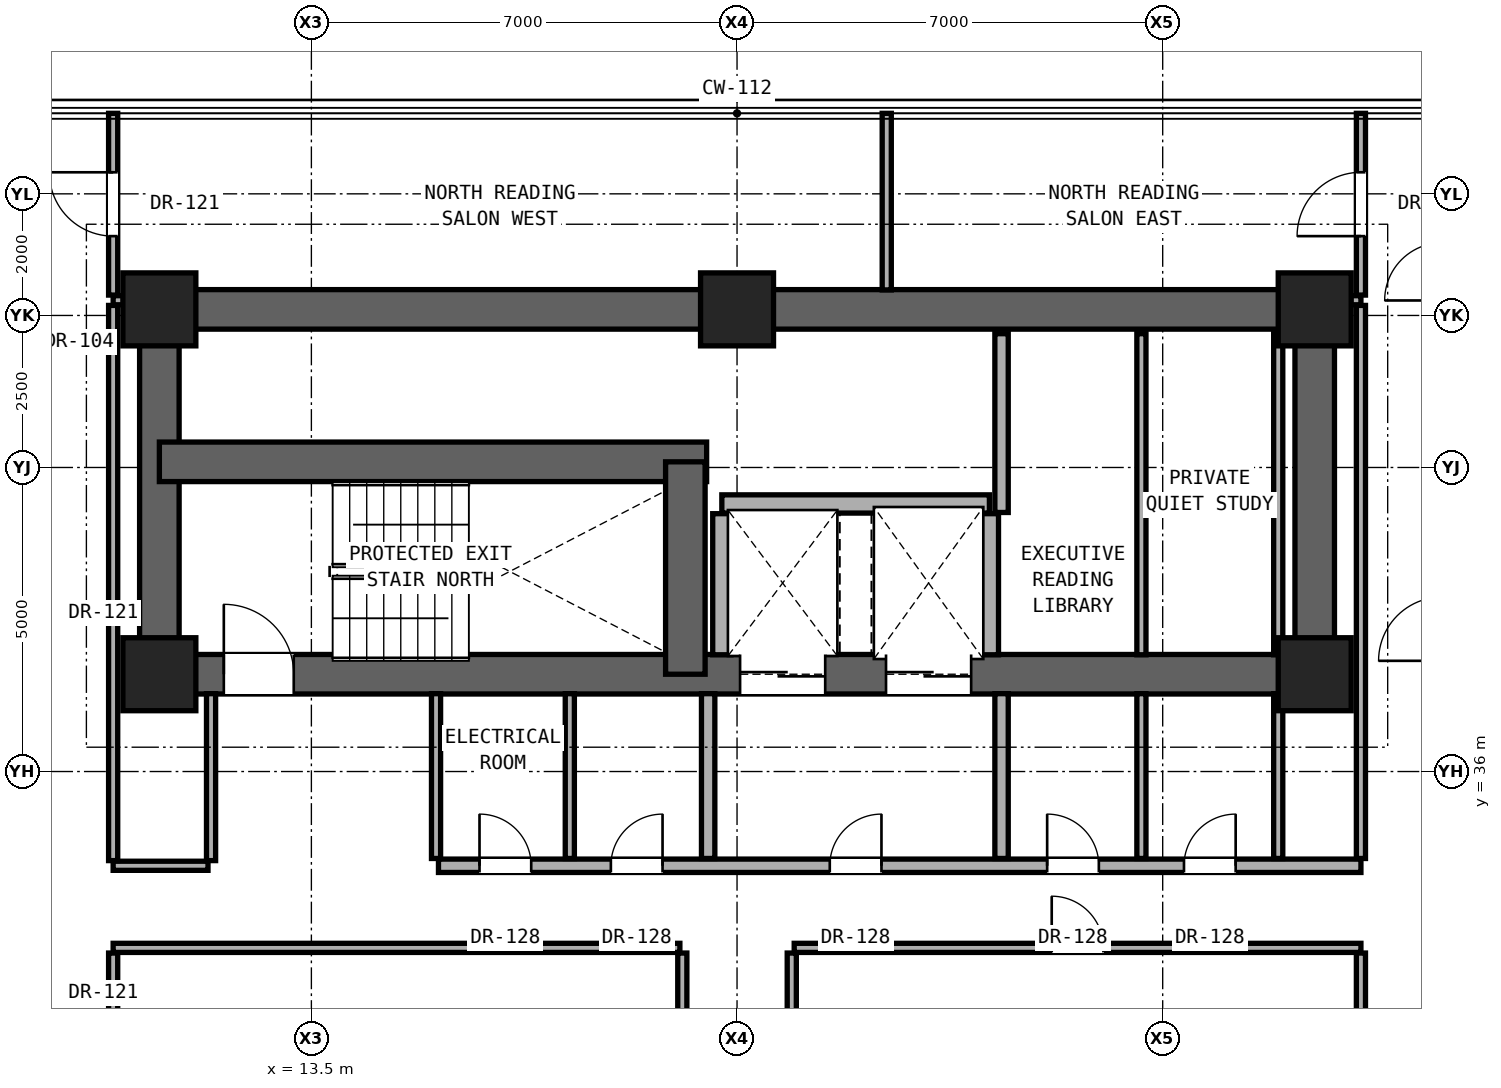
"""IFC4 building model, lengths in metres.
Left out: names, types, materials, properties, quantities, classifications, styles, units other than length and angle.
Written with IfcOpenShell. Run it as: python <this file> out.ifc"""

import sys

from ifc_helpers import new_model, si_unit, direction, frame, frame_2d, origin, origin_2d, place, context, subcontext, project, spatial, rectangle, extrude, element, fill, save


model = new_model("IFC4")
c1 = context("Model", 3, precision=1e-05, world=origin(), true_north=direction((0.0, 1.0)))
c2 = subcontext(c1, "Body", "Model", "MODEL_VIEW")
j1 = project(units=[si_unit("LENGTHUNIT", "METRE"), si_unit("PLANEANGLEUNIT", "RADIAN")], contexts=[c1])
p1 = place(None, origin())
s1 = spatial("IfcSite", under=j1, at=p1, CompositionType="ELEMENT")
p2 = place(p1, origin())
s2 = spatial("IfcBuilding", under=s1, at=p2, CompositionType="ELEMENT")
p3 = place(p2, frame((0.0, 0.0, 98.3)))
s3 = spatial("IfcBuildingStorey", under=s2, at=p3, CompositionType="ELEMENT", Elevation=98.3)
for number, where, z_axis, x_axis in (
    (1, (11.0, 37.6, 0.0), (0.0, 0.0, 1.0), (1.0, 0.0, 0.0)),
    (2, (30.0, 37.6, 0.0), (0.0, 0.0, 1.0), (1.0, 0.0, 0.0)),
    (3, (11.0, 43.6, 0.0), (0.0, 0.0, 1.0), (1.0, 0.0, 0.0)),
    (4, (20.5, 43.6, 0.0), (0.0, 0.0, 1.0), (1.0, 0.0, 0.0)),
    (5, (30.0, 43.6, 0.0), (0.0, 0.0, 1.0), (1.0, 0.0, 0.0)),
):
    element("IfcColumn", number, at=place(p3, frame(where, z_axis=z_axis, x_axis=x_axis)), inside=s3, PredefinedType="COLUMN", context=c2, shape_type="SweptSolid", body=[
        extrude(rectangle(XDim=1.2, YDim=1.2, at=origin_2d()), origin(), (0.0, 0.0, 1.0), 3.3),
    ])
p4 = place(p3, frame((11.0, 43.6, 0.0), z_axis=(0.0, 0.0, 1.0), x_axis=(1.0, 0.0, 0.0)))
e6 = element("IfcWall", 6, at=p4, inside=s3, PredefinedType="SHEAR", context=c2, shape_type="SweptSolid", body=[
    extrude(rectangle(XDim=19.0, YDim=0.65, at=frame_2d((9.5, 0.0))), origin(), (0.0, 0.0, 1.0), 3.08),
])
for number, where, z_axis, x_axis in (
    (7, (11.0, 37.6, 0.0), (0.0, 0.0, 1.0), (0.0, 1.0, 0.0)),
    (8, (30.0, 37.6, 0.0), (0.0, 0.0, 1.0), (0.0, 1.0, 0.0)),
):
    element("IfcWall", number, at=place(p3, frame(where, z_axis=z_axis, x_axis=x_axis)), inside=s3, PredefinedType="SHEAR", context=c2, shape_type="SweptSolid", body=[
        extrude(rectangle(XDim=6.0, YDim=0.65, at=frame_2d((3.0, 0.0))), origin(), (0.0, 0.0, 1.0), 3.08),
    ])
p5 = place(p3, frame((11.0, 37.6, 0.0), z_axis=(0.0, 0.0, 1.0), x_axis=(1.0, 0.0, 0.0)))
e9 = element("IfcWall", 9, at=p5, inside=s3, PredefinedType="SHEAR", context=c2, shape_type="SweptSolid", body=[
    extrude(rectangle(XDim=19.0, YDim=0.65, at=frame_2d((9.5, 0.0))), origin(), (0.0, 0.0, 1.0), 3.08),
])
p6 = place(p5, frame((1.06, 0.0, 0.0)))
e10 = element("IfcOpeningElement", 10, at=p6, cuts=e9, PredefinedType="OPENING", context=c2, shape_type="SweptSolid", body=[
    extrude(rectangle(XDim=1.15, YDim=2.2, at=frame_2d((0.575, 1.1))), frame((0.0, 0.335, 0.0), z_axis=(0.0, -1.0, 0.0), x_axis=(1.0, 0.0, 0.0)), (0.0, 0.0, 1.0), 0.67),
])
p7 = place(p5, frame((9.55, 0.0, 0.0)))
e11 = element("IfcOpeningElement", 11, at=p7, cuts=e9, PredefinedType="OPENING", context=c2, shape_type="SweptSolid", body=[
    extrude(rectangle(XDim=1.4, YDim=2.35, at=frame_2d((0.7, 1.175))), frame((0.0, 0.335, 0.0), z_axis=(0.0, -1.0, 0.0), x_axis=(1.0, 0.0, 0.0)), (0.0, 0.0, 1.0), 0.67),
])
p8 = place(p5, frame((11.95, 0.0, 0.0)))
e12 = element("IfcOpeningElement", 12, at=p8, cuts=e9, PredefinedType="OPENING", context=c2, shape_type="SweptSolid", body=[
    extrude(rectangle(XDim=1.4, YDim=2.35, at=frame_2d((0.7, 1.175))), frame((0.0, 0.335, 0.0), z_axis=(0.0, -1.0, 0.0), x_axis=(1.0, 0.0, 0.0)), (0.0, 0.0, 1.0), 0.67),
])
p9 = place(p3, frame((11.0, 41.093, 0.0), z_axis=(0.0, 0.0, 1.0), x_axis=(1.0, 0.0, 0.0)))
e13 = element("IfcWall", 13, at=p9, inside=s3, PredefinedType="SHEAR", context=c2, shape_type="SweptSolid", body=[
    extrude(rectangle(XDim=9.0, YDim=0.65, at=frame_2d((4.5, 0.0))), origin(), (0.0, 0.0, 1.0), 3.08),
])
p10 = place(p3, frame((19.65, 37.6, 0.0), z_axis=(0.0, 0.0, 1.0), x_axis=(0.0, 1.0, 0.0)))
e14 = element("IfcWall", 14, at=p10, inside=s3, PredefinedType="SHEAR", context=c2, shape_type="SweptSolid", body=[
    extrude(rectangle(XDim=3.493, YDim=0.65, at=frame_2d((1.747, 0.0))), origin(), (0.0, 0.0, 1.0), 3.08),
])
p11 = place(p3, frame((10.24, 33.1, 0.0), z_axis=(0.0, 0.0, 1.0), x_axis=(1.0, 0.0, 0.0)))
e15 = element("IfcWall", 15, at=p11, inside=s3, PredefinedType="PARTITIONING", context=c2, shape_type="SweptSolid", body=[
    extrude(rectangle(XDim=9.32, YDim=0.15, at=frame_2d((4.66, 0.0))), origin(), (0.0, 0.0, 1.0), 2.124),
])
p12 = place(p3, frame((21.44, 33.1, 0.0), z_axis=(0.0, 0.0, 1.0), x_axis=(1.0, 0.0, 0.0)))
e16 = element("IfcWall", 16, at=p12, inside=s3, PredefinedType="PARTITIONING", context=c2, shape_type="SweptSolid", body=[
    extrude(rectangle(XDim=9.32, YDim=0.15, at=frame_2d((4.66, 0.0))), origin(), (0.0, 0.0, 1.0), 2.124),
])
p13 = place(p12, frame((4.235, 0.0, 0.0)))
e17 = element("IfcOpeningElement", 17, at=p13, cuts=e16, PredefinedType="OPENING", context=c2, shape_type="SweptSolid", body=[
    extrude(rectangle(XDim=0.85, YDim=2.01, at=frame_2d((0.425, 1.005))), frame((0.0, 0.085, 0.0), z_axis=(0.0, -1.0, 0.0), x_axis=(1.0, 0.0, 0.0)), (0.0, 0.0, 1.0), 0.17),
])
p14 = place(p3, frame((10.24, 34.45, 0.0), z_axis=(0.0, 0.0, 1.0), x_axis=(1.0, 0.0, 0.0)))
e18 = element("IfcWall", 18, at=p14, inside=s3, PredefinedType="PARTITIONING", context=c2, shape_type="SweptSolid", body=[
    extrude(rectangle(XDim=1.56, YDim=0.15, at=frame_2d((0.78, 0.0))), origin(), (0.0, 0.0, 1.0), 2.124),
])
p15 = place(p3, frame((15.59, 34.45, 0.0), z_axis=(0.0, 0.0, 1.0), x_axis=(1.0, 0.0, 0.0)))
e19 = element("IfcWall", 19, at=p15, inside=s3, PredefinedType="SOLIDWALL", context=c2, shape_type="SweptSolid", body=[
    extrude(rectangle(XDim=15.17, YDim=0.22, at=frame_2d((7.585, 0.0))), origin(), (0.0, 0.0, 1.0), 2.124),
])
p16 = place(p15, frame((6.435, 0.0, 0.0)))
e20 = element("IfcOpeningElement", 20, at=p16, cuts=e19, PredefinedType="OPENING", context=c2, shape_type="SweptSolid", body=[
    extrude(rectangle(XDim=0.85, YDim=2.01, at=frame_2d((0.425, 1.005))), frame((0.0, 0.12, 0.0), z_axis=(0.0, -1.0, 0.0), x_axis=(1.0, 0.0, 0.0)), (0.0, 0.0, 1.0), 0.24),
])
p17 = place(p15, frame((10.01, 0.0, 0.0)))
e21 = element("IfcOpeningElement", 21, at=p17, cuts=e19, PredefinedType="OPENING", context=c2, shape_type="SweptSolid", body=[
    extrude(rectangle(XDim=0.85, YDim=2.01, at=frame_2d((0.425, 1.005))), frame((0.0, 0.12, 0.0), z_axis=(0.0, -1.0, 0.0), x_axis=(1.0, 0.0, 0.0)), (0.0, 0.0, 1.0), 0.24),
])
p18 = place(p15, frame((12.26, 0.0, 0.0)))
e22 = element("IfcOpeningElement", 22, at=p18, cuts=e19, PredefinedType="OPENING", context=c2, shape_type="SweptSolid", body=[
    extrude(rectangle(XDim=0.85, YDim=2.01, at=frame_2d((0.425, 1.005))), frame((0.0, 0.12, 0.0), z_axis=(0.0, -1.0, 0.0), x_axis=(1.0, 0.0, 0.0)), (0.0, 0.0, 1.0), 0.24),
])
p19 = place(p15, frame((0.675, 0.0, 0.0)))
e23 = element("IfcOpeningElement", 23, at=p19, cuts=e19, PredefinedType="OPENING", context=c2, shape_type="SweptSolid", body=[
    extrude(rectangle(XDim=0.85, YDim=2.01, at=frame_2d((0.425, 1.005))), frame((0.0, 0.12, 0.0), z_axis=(0.0, -1.0, 0.0), x_axis=(1.0, 0.0, 0.0)), (0.0, 0.0, 1.0), 0.24),
])
p20 = place(p15, frame((2.835, 0.0, 0.0)))
e24 = element("IfcOpeningElement", 24, at=p20, cuts=e19, PredefinedType="OPENING", context=c2, shape_type="SweptSolid", body=[
    extrude(rectangle(XDim=0.85, YDim=2.01, at=frame_2d((0.425, 1.005))), frame((0.0, 0.12, 0.0), z_axis=(0.0, -1.0, 0.0), x_axis=(1.0, 0.0, 0.0)), (0.0, 0.0, 1.0), 0.24),
])
p21 = place(p3, frame((20.25, 40.4, 0.0), z_axis=(0.0, 0.0, 1.0), x_axis=(1.0, 0.0, 0.0)))
e25 = element("IfcWall", 25, at=p21, inside=s3, PredefinedType="SOLIDWALL", context=c2, shape_type="SweptSolid", body=[
    extrude(rectangle(XDim=4.4, YDim=0.3, at=frame_2d((2.2, 0.0))), origin(), (0.0, 0.0, 1.0), 3.08),
])
for number, where, z_axis, x_axis in (
    (26, (10.24, 43.75, 0.0), (0.0, 0.0, 1.0), (1.0, 0.0, 0.0)),
    (27, (30.32, 43.75, 0.0), (0.0, 0.0, 1.0), (1.0, 0.0, 0.0)),
):
    element("IfcWall", number, at=place(p3, frame(where, z_axis=z_axis, x_axis=x_axis)), inside=s3, PredefinedType="PARTITIONING", context=c2, shape_type="SweptSolid", body=[
        extrude(rectangle(XDim=0.44, YDim=0.15, at=frame_2d((0.22, 0.0))), origin(), (0.0, 0.0, 1.0), 3.08),
    ])
p22 = place(p3, frame((10.24, 27.485, 0.0), z_axis=(0.0, 0.0, 1.0), x_axis=(0.0, 1.0, 0.0)))
e28 = element("IfcWall", 28, at=p22, inside=s3, PredefinedType="PARTITIONING", context=c2, shape_type="SweptSolid", body=[
    extrude(rectangle(XDim=5.53, YDim=0.15, at=frame_2d((2.765, 0.0))), origin(), (0.0, 0.0, 1.0), 2.299),
])
p23 = place(p22, frame((2.29, 0.0, 0.0)))
e29 = element("IfcOpeningElement", 29, at=p23, cuts=e28, PredefinedType="OPENING", context=c2, shape_type="SweptSolid", body=[
    extrude(rectangle(XDim=0.95, YDim=2.15, at=frame_2d((0.475, 1.075))), frame((0.0, 0.085, 0.0), z_axis=(0.0, -1.0, 0.0), x_axis=(1.0, 0.0, 0.0)), (0.0, 0.0, 1.0), 0.17),
])
p24 = place(p3, frame((10.24, 34.535, 0.0), z_axis=(0.0, 0.0, 1.0), x_axis=(0.0, 1.0, 0.0)))
e30 = element("IfcWall", 30, at=p24, inside=s3, PredefinedType="PARTITIONING", context=c2, shape_type="SweptSolid", body=[
    extrude(rectangle(XDim=9.13, YDim=0.15, at=frame_2d((4.565, 0.0))), origin(), (0.0, 0.0, 1.0), 2.456),
])
p25 = place(p3, frame((10.24, 43.835, 0.0), z_axis=(0.0, 0.0, 1.0), x_axis=(0.0, 1.0, 0.0)))
e31 = element("IfcWall", 31, at=p25, inside=s3, PredefinedType="PARTITIONING", context=c2, shape_type="SweptSolid", body=[
    extrude(rectangle(XDim=2.989, YDim=0.15, at=frame_2d((1.495, 0.0))), origin(), (0.0, 0.0, 1.0), 3.08),
])
p26 = place(p25, frame((0.969, 0.0, 0.0)))
e32 = element("IfcOpeningElement", 32, at=p26, cuts=e31, PredefinedType="OPENING", context=c2, shape_type="SweptSolid", body=[
    extrude(rectangle(XDim=1.05, YDim=2.2, at=frame_2d((0.525, 1.1))), frame((0.0, 0.085, 0.0), z_axis=(0.0, -1.0, 0.0), x_axis=(1.0, 0.0, 0.0)), (0.0, 0.0, 1.0), 0.17),
])
p27 = place(p3, frame((11.85, 34.535, 0.0), z_axis=(0.0, 0.0, 1.0), x_axis=(0.0, 1.0, 0.0)))
e33 = element("IfcWall", 33, at=p27, inside=s3, PredefinedType="PARTITIONING", context=c2, shape_type="SweptSolid", body=[
    extrude(rectangle(XDim=2.745, YDim=0.15, at=frame_2d((1.373, 0.0))), origin(), (0.0, 0.0, 1.0), 3.08),
])
p28 = place(p3, frame((15.55, 34.57, 0.0), z_axis=(0.0, 0.0, 1.0), x_axis=(0.0, 1.0, 0.0)))
e34 = element("IfcWall", 34, at=p28, inside=s3, PredefinedType="PARTITIONING", context=c2, shape_type="SweptSolid", body=[
    extrude(rectangle(XDim=2.71, YDim=0.15, at=frame_2d((1.355, 0.0))), origin(), (0.0, 0.0, 1.0), 2.609),
])
p29 = place(p3, frame((17.75, 34.57, 0.0), z_axis=(0.0, 0.0, 1.0), x_axis=(0.0, 1.0, 0.0)))
e35 = element("IfcWall", 35, at=p29, inside=s3, PredefinedType="PARTITIONING", context=c2, shape_type="SweptSolid", body=[
    extrude(rectangle(XDim=2.71, YDim=0.15, at=frame_2d((1.355, 0.0))), origin(), (0.0, 0.0, 1.0), 3.08),
])
p30 = place(p3, frame((19.6, 27.485, 0.0), z_axis=(0.0, 0.0, 1.0), x_axis=(0.0, 1.0, 0.0)))
e36 = element("IfcWall", 36, at=p30, inside=s3, PredefinedType="PARTITIONING", context=c2, shape_type="SweptSolid", body=[
    extrude(rectangle(XDim=5.53, YDim=0.15, at=frame_2d((2.765, 0.0))), origin(), (0.0, 0.0, 1.0), 2.124),
])
p31 = place(p3, frame((20.025, 34.57, 0.0), z_axis=(0.0, 0.0, 1.0), x_axis=(0.0, 1.0, 0.0)))
e37 = element("IfcWall", 37, at=p31, inside=s3, PredefinedType="SOLIDWALL", context=c2, shape_type="SweptSolid", body=[
    extrude(rectangle(XDim=2.71, YDim=0.22, at=frame_2d((1.355, 0.0))), origin(), (0.0, 0.0, 1.0), 3.08),
])
p32 = place(p3, frame((20.25, 37.92, 0.0), z_axis=(0.0, 0.0, 1.0), x_axis=(0.0, 1.0, 0.0)))
e38 = element("IfcWall", 38, at=p32, inside=s3, PredefinedType="SOLIDWALL", context=c2, shape_type="SweptSolid", body=[
    extrude(rectangle(XDim=2.32, YDim=0.3, at=frame_2d((1.16, 0.0))), origin(), (0.0, 0.0, 1.0), 3.08),
])
p33 = place(p3, frame((21.4, 27.485, 0.0), z_axis=(0.0, 0.0, 1.0), x_axis=(0.0, 1.0, 0.0)))
e39 = element("IfcWall", 39, at=p33, inside=s3, PredefinedType="PARTITIONING", context=c2, shape_type="SweptSolid", body=[
    extrude(rectangle(XDim=5.53, YDim=0.15, at=frame_2d((2.765, 0.0))), origin(), (0.0, 0.0, 1.0), 2.124),
])
p34 = place(p3, frame((22.962, 43.92, 0.0), z_axis=(0.0, 0.0, 1.0), x_axis=(0.0, 1.0, 0.0)))
e40 = element("IfcWall", 40, at=p34, inside=s3, PredefinedType="PARTITIONING", context=c2, shape_type="SweptSolid", body=[
    extrude(rectangle(XDim=2.904, YDim=0.15, at=frame_2d((1.452, 0.0))), origin(), (0.0, 0.0, 1.0), 3.08),
])
p35 = place(p3, frame((24.65, 37.92, 0.0), z_axis=(0.0, 0.0, 1.0), x_axis=(0.0, 1.0, 0.0)))
e41 = element("IfcWall", 41, at=p35, inside=s3, PredefinedType="SOLIDWALL", context=c2, shape_type="SweptSolid", body=[
    extrude(rectangle(XDim=2.32, YDim=0.3, at=frame_2d((1.16, 0.0))), origin(), (0.0, 0.0, 1.0), 3.08),
])
p36 = place(p3, frame((24.85, 34.57, 0.0), z_axis=(0.0, 0.0, 1.0), x_axis=(0.0, 1.0, 0.0)))
e42 = element("IfcWall", 42, at=p36, inside=s3, PredefinedType="SOLIDWALL", context=c2, shape_type="SweptSolid", body=[
    extrude(rectangle(XDim=2.71, YDim=0.22, at=frame_2d((1.355, 0.0))), origin(), (0.0, 0.0, 1.0), 3.08),
])
p37 = place(p3, frame((24.85, 40.26, 0.0), z_axis=(0.0, 0.0, 1.0), x_axis=(0.0, 1.0, 0.0)))
e43 = element("IfcWall", 43, at=p37, inside=s3, PredefinedType="SOLIDWALL", context=c2, shape_type="SweptSolid", body=[
    extrude(rectangle(XDim=2.94, YDim=0.22, at=frame_2d((1.47, 0.0))), origin(), (0.0, 0.0, 1.0), 3.08),
])
p38 = place(p3, frame((27.15, 34.57, 0.0), z_axis=(0.0, 0.0, 1.0), x_axis=(0.0, 1.0, 0.0)))
e44 = element("IfcWall", 44, at=p38, inside=s3, PredefinedType="PARTITIONING", context=c2, shape_type="SweptSolid", body=[
    extrude(rectangle(XDim=2.71, YDim=0.15, at=frame_2d((1.355, 0.0))), origin(), (0.0, 0.0, 1.0), 3.08),
])
p39 = place(p3, frame((27.15, 37.92, 0.0), z_axis=(0.0, 0.0, 1.0), x_axis=(0.0, 1.0, 0.0)))
e45 = element("IfcWall", 45, at=p39, inside=s3, PredefinedType="PARTITIONING", context=c2, shape_type="SweptSolid", body=[
    extrude(rectangle(XDim=5.28, YDim=0.15, at=frame_2d((2.64, 0.0))), origin(), (0.0, 0.0, 1.0), 3.08),
])
p40 = place(p3, frame((29.4, 34.57, 0.0), z_axis=(0.0, 0.0, 1.0), x_axis=(0.0, 1.0, 0.0)))
e46 = element("IfcWall", 46, at=p40, inside=s3, PredefinedType="PARTITIONING", context=c2, shape_type="SweptSolid", body=[
    extrude(rectangle(XDim=2.71, YDim=0.15, at=frame_2d((1.355, 0.0))), origin(), (0.0, 0.0, 1.0), 3.08),
])
p41 = place(p3, frame((29.4, 37.92, 0.0), z_axis=(0.0, 0.0, 1.0), x_axis=(0.0, 1.0, 0.0)))
e47 = element("IfcWall", 47, at=p41, inside=s3, PredefinedType="PARTITIONING", context=c2, shape_type="SweptSolid", body=[
    extrude(rectangle(XDim=5.28, YDim=0.15, at=frame_2d((2.64, 0.0))), origin(), (0.0, 0.0, 1.0), 3.08),
])
p42 = place(p3, frame((30.76, 27.485, 0.0), z_axis=(0.0, 0.0, 1.0), x_axis=(0.0, 1.0, 0.0)))
e48 = element("IfcWall", 48, at=p42, inside=s3, PredefinedType="PARTITIONING", context=c2, shape_type="SweptSolid", body=[
    extrude(rectangle(XDim=5.53, YDim=0.15, at=frame_2d((2.765, 0.0))), origin(), (0.0, 0.0, 1.0), 2.299),
])
p43 = place(p3, frame((30.76, 34.57, 0.0), z_axis=(0.0, 0.0, 1.0), x_axis=(0.0, 1.0, 0.0)))
e49 = element("IfcWall", 49, at=p43, inside=s3, PredefinedType="PARTITIONING", context=c2, shape_type="SweptSolid", body=[
    extrude(rectangle(XDim=9.095, YDim=0.15, at=frame_2d((4.547, 0.0))), origin(), (0.0, 0.0, 1.0), 2.456),
])
p44 = place(p3, frame((30.76, 43.835, 0.0), z_axis=(0.0, 0.0, 1.0), x_axis=(0.0, 1.0, 0.0)))
e50 = element("IfcWall", 50, at=p44, inside=s3, PredefinedType="PARTITIONING", context=c2, shape_type="SweptSolid", body=[
    extrude(rectangle(XDim=2.989, YDim=0.15, at=frame_2d((1.495, 0.0))), origin(), (0.0, 0.0, 1.0), 3.08),
])
p45 = place(p44, frame((0.969, 0.0, 0.0)))
e51 = element("IfcOpeningElement", 51, at=p45, cuts=e50, PredefinedType="OPENING", context=c2, shape_type="SweptSolid", body=[
    extrude(rectangle(XDim=1.05, YDim=2.2, at=frame_2d((0.525, 1.1))), frame((0.0, 0.085, 0.0), z_axis=(0.0, -1.0, 0.0), x_axis=(1.0, 0.0, 0.0)), (0.0, 0.0, 1.0), 0.17),
])
p46 = place(p6, origin())
e52 = element("IfcDoor", 52, at=p46, inside=s3, OperationType="SINGLE_SWING_LEFT", PredefinedType="DOOR", context=c2, shape_type="SweptSolid", body=[
    extrude(rectangle(XDim=1.15, YDim=2.2, at=frame_2d((0.575, 1.1))), frame((0.0, 0.025, 0.0), z_axis=(0.0, -1.0, 0.0), x_axis=(1.0, 0.0, 0.0)), (0.0, 0.0, 1.0), 0.05),
])
fill(e10, e52)
p47 = place(p16, origin())
e53 = element("IfcDoor", 53, at=p47, inside=s3, OperationType="SINGLE_SWING_RIGHT", PredefinedType="DOOR", context=c2, shape_type="SweptSolid", body=[
    extrude(rectangle(XDim=0.85, YDim=2.01, at=frame_2d((0.425, 1.005))), frame((0.0, 0.025, 0.0), z_axis=(0.0, -1.0, 0.0), x_axis=(1.0, 0.0, 0.0)), (0.0, 0.0, 1.0), 0.05),
])
fill(e20, e53)
p48 = place(p17, origin())
e54 = element("IfcDoor", 54, at=p48, inside=s3, OperationType="SINGLE_SWING_LEFT", PredefinedType="DOOR", context=c2, shape_type="SweptSolid", body=[
    extrude(rectangle(XDim=0.85, YDim=2.01, at=frame_2d((0.425, 1.005))), frame((0.0, 0.025, 0.0), z_axis=(0.0, -1.0, 0.0), x_axis=(1.0, 0.0, 0.0)), (0.0, 0.0, 1.0), 0.05),
])
fill(e21, e54)
p49 = place(p18, origin())
e55 = element("IfcDoor", 55, at=p49, inside=s3, OperationType="SINGLE_SWING_RIGHT", PredefinedType="DOOR", context=c2, shape_type="SweptSolid", body=[
    extrude(rectangle(XDim=0.85, YDim=2.01, at=frame_2d((0.425, 1.005))), frame((0.0, 0.025, 0.0), z_axis=(0.0, -1.0, 0.0), x_axis=(1.0, 0.0, 0.0)), (0.0, 0.0, 1.0), 0.05),
])
fill(e22, e55)
p50 = place(p19, origin())
e56 = element("IfcDoor", 56, at=p50, inside=s3, OperationType="SINGLE_SWING_LEFT", PredefinedType="DOOR", context=c2, shape_type="SweptSolid", body=[
    extrude(rectangle(XDim=0.85, YDim=2.01, at=frame_2d((0.425, 1.005))), frame((0.0, 0.025, 0.0), z_axis=(0.0, -1.0, 0.0), x_axis=(1.0, 0.0, 0.0)), (0.0, 0.0, 1.0), 0.05),
])
fill(e23, e56)
p51 = place(p20, origin())
e57 = element("IfcDoor", 57, at=p51, inside=s3, OperationType="SINGLE_SWING_RIGHT", PredefinedType="DOOR", context=c2, shape_type="SweptSolid", body=[
    extrude(rectangle(XDim=0.85, YDim=2.01, at=frame_2d((0.425, 1.005))), frame((0.0, 0.025, 0.0), z_axis=(0.0, -1.0, 0.0), x_axis=(1.0, 0.0, 0.0)), (0.0, 0.0, 1.0), 0.05),
])
fill(e24, e57)
p52 = place(p13, origin())
e58 = element("IfcDoor", 58, at=p52, inside=s3, OperationType="SINGLE_SWING_LEFT", PredefinedType="DOOR", context=c2, shape_type="SweptSolid", body=[
    extrude(rectangle(XDim=0.85, YDim=2.01, at=frame_2d((0.425, 1.005))), frame((0.0, 0.025, 0.0), z_axis=(0.0, -1.0, 0.0), x_axis=(1.0, 0.0, 0.0)), (0.0, 0.0, 1.0), 0.05),
])
fill(e17, e58)
p53 = place(p26, origin())
e59 = element("IfcDoor", 59, at=p53, inside=s3, OperationType="SINGLE_SWING_RIGHT", PredefinedType="DOOR", context=c2, shape_type="SweptSolid", body=[
    extrude(rectangle(XDim=1.05, YDim=2.2, at=frame_2d((0.525, 1.1))), frame((0.0, 0.025, 0.0), z_axis=(0.0, -1.0, 0.0), x_axis=(1.0, 0.0, 0.0)), (0.0, 0.0, 1.0), 0.05),
])
fill(e32, e59)
p54 = place(p45, origin())
e60 = element("IfcDoor", 60, at=p54, inside=s3, OperationType="SINGLE_SWING_LEFT", PredefinedType="DOOR", context=c2, shape_type="SweptSolid", body=[
    extrude(rectangle(XDim=1.05, YDim=2.2, at=frame_2d((0.525, 1.1))), frame((0.0, 0.025, 0.0), z_axis=(0.0, -1.0, 0.0), x_axis=(1.0, 0.0, 0.0)), (0.0, 0.0, 1.0), 0.05),
])
fill(e51, e60)
p55 = place(p7, origin())
e61 = element("IfcDoor", 61, at=p55, inside=s3, OperationType="DOUBLE_DOOR_SLIDING", PredefinedType="DOOR", context=c2, shape_type="SweptSolid", body=[
    extrude(rectangle(XDim=1.4, YDim=2.35, at=frame_2d((0.7, 1.175))), frame((0.0, 0.025, 0.0), z_axis=(0.0, -1.0, 0.0), x_axis=(1.0, 0.0, 0.0)), (0.0, 0.0, 1.0), 0.05),
])
fill(e11, e61)
p56 = place(p8, origin())
e62 = element("IfcDoor", 62, at=p56, inside=s3, OperationType="DOUBLE_DOOR_SLIDING", PredefinedType="DOOR", context=c2, shape_type="SweptSolid", body=[
    extrude(rectangle(XDim=1.4, YDim=2.35, at=frame_2d((0.7, 1.175))), frame((0.0, 0.025, 0.0), z_axis=(0.0, -1.0, 0.0), x_axis=(1.0, 0.0, 0.0)), (0.0, 0.0, 1.0), 0.05),
])
fill(e12, e62)
save(model, sys.argv[1])
